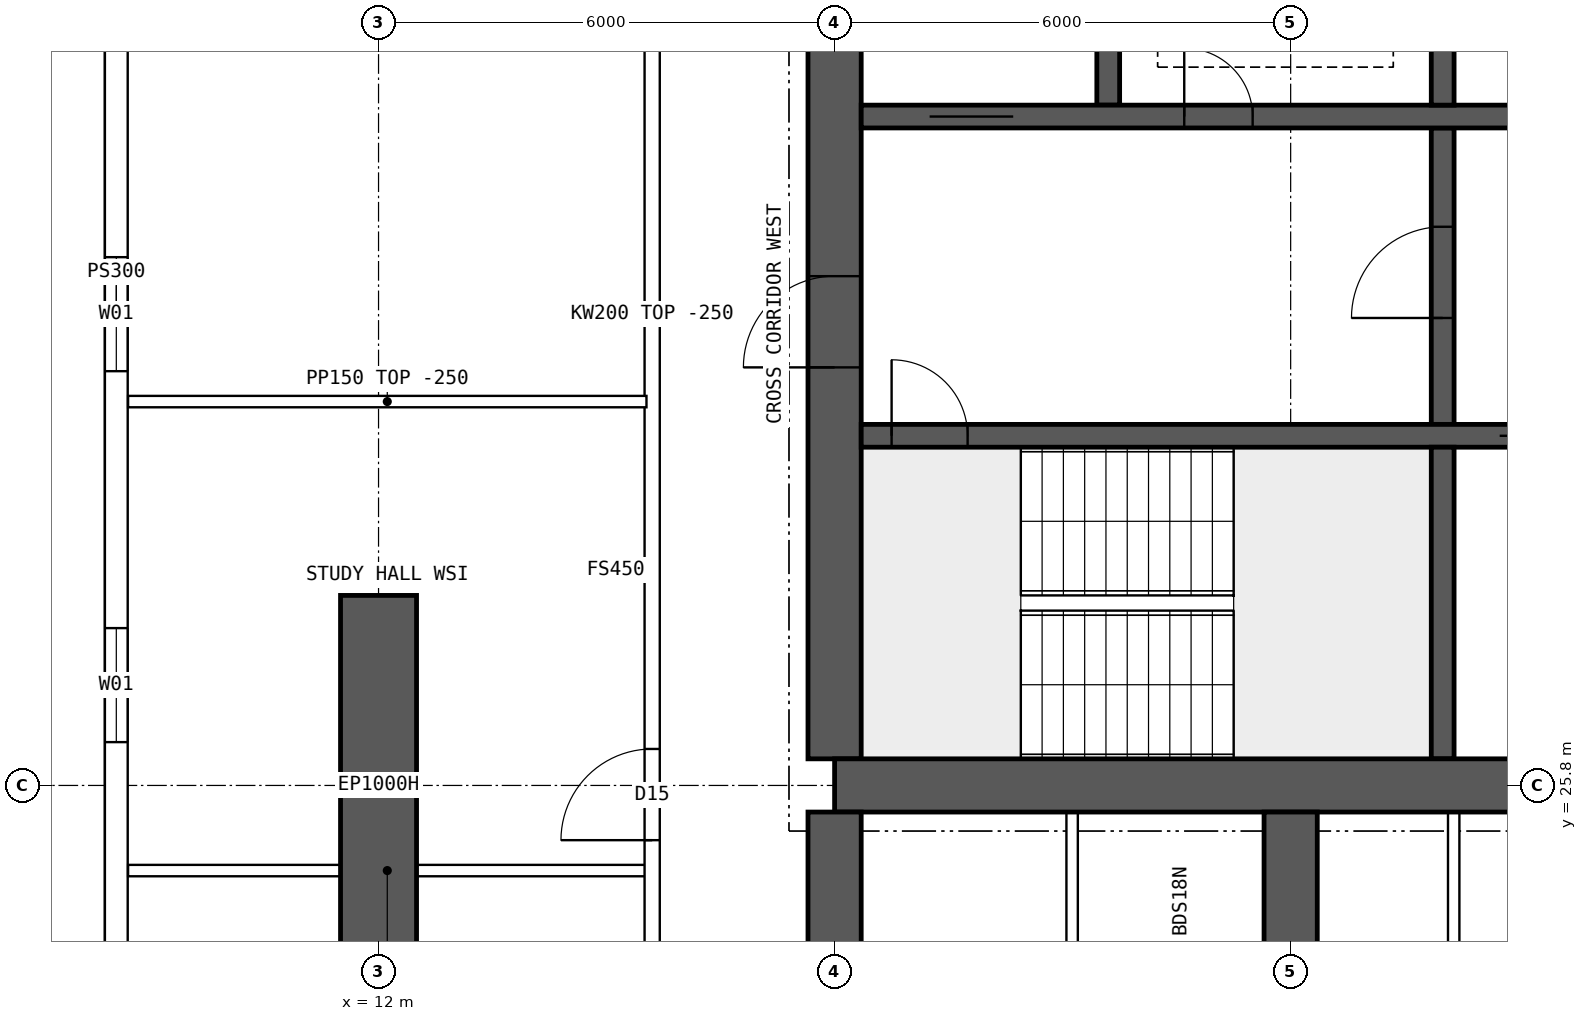
"""IFC4 building model, lengths in metres.
Left out: names, types, materials, properties, quantities, classifications, styles, units other than length and angle.
Written with IfcOpenShell. Run it as: python <this file> out.ifc"""

import sys

from ifc_helpers import new_model, si_unit, direction, frame, frame_2d, origin, place, context, subcontext, project, spatial, polyline, rectangle, outline, extrude, element, fill, save


model = new_model("IFC4")
c1 = context("Model", 3, precision=1e-05, world=origin(), true_north=direction((0.0, 1.0)))
c2 = subcontext(c1, "Body", "Model", "MODEL_VIEW")
j1 = project(units=[si_unit("LENGTHUNIT", "METRE"), si_unit("PLANEANGLEUNIT", "RADIAN")], contexts=[c1])
p1 = place(None, origin())
s1 = spatial("IfcSite", under=j1, at=p1, CompositionType="ELEMENT")
p2 = place(p1, origin())
s2 = spatial("IfcBuilding", under=s1, at=p2, CompositionType="ELEMENT")
p3 = place(p2, frame((0.0, 0.0, 231.55)))
s3 = spatial("IfcBuildingStorey", under=s2, at=p3, CompositionType="ELEMENT", Elevation=231.55)
p4 = place(p3, frame((12.0, 23.3, 0.0), z_axis=(0.0, 0.0, 1.0), x_axis=(0.0, 1.0, 0.0)))
e1 = element("IfcWall", 1, at=p4, inside=s3, PredefinedType="SHEAR", context=c2, shape_type="SweptSolid", body=[
    extrude(rectangle(XDim=5.0, YDim=1.0, at=frame_2d((2.5, 0.0))), origin(), (0.0, 0.0, 1.0), 3.75),
])
p5 = place(p3, frame((18.0, 25.8, 0.0), z_axis=(0.0, 0.0, 1.0), x_axis=(1.0, 0.0, 0.0)))
e2 = element("IfcWall", 2, at=p5, inside=s3, PredefinedType="SHEAR", context=c2, shape_type="SweptSolid", body=[
    extrude(rectangle(XDim=48.0, YDim=0.7, at=frame_2d((24.0, 0.0))), origin(), (0.0, 0.0, 1.0), 3.75),
])
p6 = place(p3, frame((18.0, 26.15, 0.0), z_axis=(0.0, 0.0, 1.0), x_axis=(0.0, 1.0, 0.0)))
e3 = element("IfcWall", 3, at=p6, inside=s3, PredefinedType="SHEAR", context=c2, shape_type="SweptSolid", body=[
    extrude(rectangle(XDim=11.7, YDim=0.7, at=frame_2d((5.85, 0.0))), origin(), (0.0, 0.0, 1.0), 3.75),
])
p7 = place(p6, frame((5.15, 0.0, 0.0)))
e4 = element("IfcOpeningElement", 4, at=p7, cuts=e3, PredefinedType="OPENING", context=c2, shape_type="SweptSolid", body=[
    extrude(rectangle(XDim=1.2, YDim=2.1, at=frame_2d((0.6, 1.05))), frame((0.0, 0.36, 0.0), z_axis=(0.0, -1.0, 0.0), x_axis=(1.0, 0.0, 0.0)), (0.0, 0.0, 1.0), 0.72),
])
p8 = place(p3, frame((18.35, 30.4, 0.0), z_axis=(0.0, 0.0, 1.0), x_axis=(1.0, 0.0, 0.0)))
e5 = element("IfcWall", 5, at=p8, inside=s3, PredefinedType="SHEAR", context=c2, shape_type="SweptSolid", body=[
    extrude(rectangle(XDim=47.3, YDim=0.3, at=frame_2d((23.65, 0.0))), origin(), (0.0, 0.0, 1.0), 3.75),
])
p9 = place(p8, frame((0.4, 0.0, 0.0)))
e6 = element("IfcOpeningElement", 6, at=p9, cuts=e5, PredefinedType="OPENING", context=c2, shape_type="SweptSolid", body=[
    extrude(rectangle(XDim=1.0, YDim=2.1, at=frame_2d((0.5, 1.05))), frame((0.0, 0.16, 0.0), z_axis=(0.0, -1.0, 0.0), x_axis=(1.0, 0.0, 0.0)), (0.0, 0.0, 1.0), 0.32),
])
p10 = place(p8, frame((45.9, 0.0, 0.0)))
e7 = element("IfcOpeningElement", 7, at=p10, cuts=e5, PredefinedType="OPENING", context=c2, shape_type="SweptSolid", body=[
    extrude(rectangle(XDim=1.0, YDim=2.1, at=frame_2d((0.5, 1.05))), frame((0.0, 0.16, 0.0), z_axis=(0.0, -1.0, 0.0), x_axis=(1.0, 0.0, 0.0)), (0.0, 0.0, 1.0), 0.32),
])
p11 = place(p8, frame((8.4, 0.0, 0.0)))
e8 = element("IfcOpeningElement", 8, at=p11, cuts=e5, PredefinedType="OPENING", context=c2, shape_type="SweptSolid", body=[
    extrude(rectangle(XDim=1.1, YDim=2.1, at=frame_2d((0.55, 1.05))), frame((0.0, 0.16, 0.0), z_axis=(0.0, -1.0, 0.0), x_axis=(1.0, 0.0, 0.0)), (0.0, 0.0, 1.0), 0.32),
])
p12 = place(p8, frame((11.0, 0.0, 0.0)))
e9 = element("IfcOpeningElement", 9, at=p12, cuts=e5, PredefinedType="OPENING", context=c2, shape_type="SweptSolid", body=[
    extrude(rectangle(XDim=1.1, YDim=2.1, at=frame_2d((0.55, 1.05))), frame((0.0, 0.16, 0.0), z_axis=(0.0, -1.0, 0.0), x_axis=(1.0, 0.0, 0.0)), (0.0, 0.0, 1.0), 0.32),
])
p13 = place(p8, frame((13.6, 0.0, 0.0)))
e10 = element("IfcOpeningElement", 10, at=p13, cuts=e5, PredefinedType="OPENING", context=c2, shape_type="SweptSolid", body=[
    extrude(rectangle(XDim=1.1, YDim=2.1, at=frame_2d((0.55, 1.05))), frame((0.0, 0.16, 0.0), z_axis=(0.0, -1.0, 0.0), x_axis=(1.0, 0.0, 0.0)), (0.0, 0.0, 1.0), 0.32),
])
p14 = place(p8, frame((16.2, 0.0, 0.0)))
e11 = element("IfcOpeningElement", 11, at=p14, cuts=e5, PredefinedType="OPENING", context=c2, shape_type="SweptSolid", body=[
    extrude(rectangle(XDim=1.1, YDim=2.1, at=frame_2d((0.55, 1.05))), frame((0.0, 0.16, 0.0), z_axis=(0.0, -1.0, 0.0), x_axis=(1.0, 0.0, 0.0)), (0.0, 0.0, 1.0), 0.32),
])
p15 = place(p8, frame((18.975, 0.0, 0.0)))
e12 = element("IfcOpeningElement", 12, at=p15, cuts=e5, PredefinedType="OPENING", context=c2, shape_type="SweptSolid", body=[
    extrude(rectangle(XDim=0.9, YDim=2.1, at=frame_2d((0.45, 1.05))), frame((0.0, 0.16, 0.0), z_axis=(0.0, -1.0, 0.0), x_axis=(1.0, 0.0, 0.0)), (0.0, 0.0, 1.0), 0.32),
])
p16 = place(p8, frame((24.475, 0.0, 0.0)))
e13 = element("IfcOpeningElement", 13, at=p16, cuts=e5, PredefinedType="OPENING", context=c2, shape_type="SweptSolid", body=[
    extrude(rectangle(XDim=0.9, YDim=2.1, at=frame_2d((0.45, 1.05))), frame((0.0, 0.16, 0.0), z_axis=(0.0, -1.0, 0.0), x_axis=(1.0, 0.0, 0.0)), (0.0, 0.0, 1.0), 0.32),
])
p17 = place(p8, frame((30.267, 0.0, 0.0)))
e14 = element("IfcOpeningElement", 14, at=p17, cuts=e5, PredefinedType="OPENING", context=c2, shape_type="SweptSolid", body=[
    extrude(rectangle(XDim=1.1, YDim=2.1, at=frame_2d((0.55, 1.05))), frame((0.0, 0.16, 0.0), z_axis=(0.0, -1.0, 0.0), x_axis=(1.0, 0.0, 0.0)), (0.0, 0.0, 1.0), 0.32),
])
p18 = place(p8, frame((33.8, 0.0, 0.0)))
e15 = element("IfcOpeningElement", 15, at=p18, cuts=e5, PredefinedType="OPENING", context=c2, shape_type="SweptSolid", body=[
    extrude(rectangle(XDim=1.1, YDim=2.1, at=frame_2d((0.55, 1.05))), frame((0.0, 0.16, 0.0), z_axis=(0.0, -1.0, 0.0), x_axis=(1.0, 0.0, 0.0)), (0.0, 0.0, 1.0), 0.32),
])
p19 = place(p8, frame((37.333, 0.0, 0.0)))
e16 = element("IfcOpeningElement", 16, at=p19, cuts=e5, PredefinedType="OPENING", context=c2, shape_type="SweptSolid", body=[
    extrude(rectangle(XDim=1.1, YDim=2.1, at=frame_2d((0.55, 1.05))), frame((0.0, 0.16, 0.0), z_axis=(0.0, -1.0, 0.0), x_axis=(1.0, 0.0, 0.0)), (0.0, 0.0, 1.0), 0.32),
])
p20 = place(p3, frame((18.35, 34.6, 0.0), z_axis=(0.0, 0.0, 1.0), x_axis=(1.0, 0.0, 0.0)))
e17 = element("IfcWall", 17, at=p20, inside=s3, PredefinedType="SHEAR", context=c2, shape_type="SweptSolid", body=[
    extrude(rectangle(XDim=47.3, YDim=0.3, at=frame_2d((23.65, 0.0))), origin(), (0.0, 0.0, 1.0), 3.75),
])
p21 = place(p20, frame((0.9, 0.0, 0.0)))
e18 = element("IfcOpeningElement", 18, at=p21, cuts=e17, PredefinedType="OPENING", context=c2, shape_type="SweptSolid", body=[
    extrude(rectangle(XDim=1.1, YDim=2.1, at=frame_2d((0.55, 1.05))), frame((0.0, 0.16, 0.0), z_axis=(0.0, -1.0, 0.0), x_axis=(1.0, 0.0, 0.0)), (0.0, 0.0, 1.0), 0.32),
])
p22 = place(p20, frame((45.3, 0.0, 0.0)))
e19 = element("IfcOpeningElement", 19, at=p22, cuts=e17, PredefinedType="OPENING", context=c2, shape_type="SweptSolid", body=[
    extrude(rectangle(XDim=1.1, YDim=2.1, at=frame_2d((0.55, 1.05))), frame((0.0, 0.16, 0.0), z_axis=(0.0, -1.0, 0.0), x_axis=(1.0, 0.0, 0.0)), (0.0, 0.0, 1.0), 0.32),
])
p23 = place(p20, frame((4.25, 0.0, 0.0)))
e20 = element("IfcOpeningElement", 20, at=p23, cuts=e17, PredefinedType="OPENING", context=c2, shape_type="SweptSolid", body=[
    extrude(rectangle(XDim=0.9, YDim=2.1, at=frame_2d((0.45, 1.05))), frame((0.0, 0.16, 0.0), z_axis=(0.0, -1.0, 0.0), x_axis=(1.0, 0.0, 0.0)), (0.0, 0.0, 1.0), 0.32),
])
p24 = place(p20, frame((42.15, 0.0, 0.0)))
e21 = element("IfcOpeningElement", 21, at=p24, cuts=e17, PredefinedType="OPENING", context=c2, shape_type="SweptSolid", body=[
    extrude(rectangle(XDim=0.9, YDim=2.1, at=frame_2d((0.45, 1.05))), frame((0.0, 0.16, 0.0), z_axis=(0.0, -1.0, 0.0), x_axis=(1.0, 0.0, 0.0)), (0.0, 0.0, 1.0), 0.32),
])
p25 = place(p20, frame((9.025, 0.0, 0.0)))
e22 = element("IfcOpeningElement", 22, at=p25, cuts=e17, PredefinedType="OPENING", context=c2, shape_type="SweptSolid", body=[
    extrude(rectangle(XDim=0.9, YDim=2.1, at=frame_2d((0.45, 1.05))), frame((0.0, 0.16, 0.0), z_axis=(0.0, -1.0, 0.0), x_axis=(1.0, 0.0, 0.0)), (0.0, 0.0, 1.0), 0.32),
])
p26 = place(p20, frame((12.999, 0.0, 0.0)))
e23 = element("IfcOpeningElement", 23, at=p26, cuts=e17, PredefinedType="OPENING", context=c2, shape_type="SweptSolid", body=[
    extrude(rectangle(XDim=0.9, YDim=2.1, at=frame_2d((0.45, 1.05))), frame((0.0, 0.16, 0.0), z_axis=(0.0, -1.0, 0.0), x_axis=(1.0, 0.0, 0.0)), (0.0, 0.0, 1.0), 0.32),
])
p27 = place(p20, frame((16.646, 0.0, 0.0)))
e24 = element("IfcOpeningElement", 24, at=p27, cuts=e17, PredefinedType="OPENING", context=c2, shape_type="SweptSolid", body=[
    extrude(rectangle(XDim=0.9, YDim=2.1, at=frame_2d((0.45, 1.05))), frame((0.0, 0.16, 0.0), z_axis=(0.0, -1.0, 0.0), x_axis=(1.0, 0.0, 0.0)), (0.0, 0.0, 1.0), 0.32),
])
p28 = place(p20, frame((20.405, 0.0, 0.0)))
e25 = element("IfcOpeningElement", 25, at=p28, cuts=e17, PredefinedType="OPENING", context=c2, shape_type="SweptSolid", body=[
    extrude(rectangle(XDim=0.9, YDim=2.1, at=frame_2d((0.45, 1.05))), frame((0.0, 0.16, 0.0), z_axis=(0.0, -1.0, 0.0), x_axis=(1.0, 0.0, 0.0)), (0.0, 0.0, 1.0), 0.32),
])
p29 = place(p20, frame((24.811, 0.0, 0.0)))
e26 = element("IfcOpeningElement", 26, at=p29, cuts=e17, PredefinedType="OPENING", context=c2, shape_type="SweptSolid", body=[
    extrude(rectangle(XDim=0.9, YDim=2.1, at=frame_2d((0.45, 1.05))), frame((0.0, 0.16, 0.0), z_axis=(0.0, -1.0, 0.0), x_axis=(1.0, 0.0, 0.0)), (0.0, 0.0, 1.0), 0.32),
])
p30 = place(p20, frame((27.608, 0.0, 0.0)))
e27 = element("IfcOpeningElement", 27, at=p30, cuts=e17, PredefinedType="OPENING", context=c2, shape_type="SweptSolid", body=[
    extrude(rectangle(XDim=0.9, YDim=2.1, at=frame_2d((0.45, 1.05))), frame((0.0, 0.16, 0.0), z_axis=(0.0, -1.0, 0.0), x_axis=(1.0, 0.0, 0.0)), (0.0, 0.0, 1.0), 0.32),
])
p31 = place(p20, frame((33.729, 0.0, 0.0)))
e28 = element("IfcOpeningElement", 28, at=p31, cuts=e17, PredefinedType="OPENING", context=c2, shape_type="SweptSolid", body=[
    extrude(rectangle(XDim=0.9, YDim=2.1, at=frame_2d((0.45, 1.05))), frame((0.0, 0.16, 0.0), z_axis=(0.0, -1.0, 0.0), x_axis=(1.0, 0.0, 0.0)), (0.0, 0.0, 1.0), 0.32),
])
p32 = place(p3, frame((26.0, 26.15, 0.0), z_axis=(0.0, 0.0, 1.0), x_axis=(0.0, 1.0, 0.0)))
e29 = element("IfcWall", 29, at=p32, inside=s3, PredefinedType="SHEAR", context=c2, shape_type="SweptSolid", body=[
    extrude(rectangle(XDim=4.1, YDim=0.3, at=frame_2d((2.05, 0.0))), origin(), (0.0, 0.0, 1.0), 3.75),
])
p33 = place(p3, frame((26.0, 30.55, 0.0), z_axis=(0.0, 0.0, 1.0), x_axis=(0.0, 1.0, 0.0)))
e30 = element("IfcWall", 30, at=p33, inside=s3, PredefinedType="SHEAR", context=c2, shape_type="SweptSolid", body=[
    extrude(rectangle(XDim=3.9, YDim=0.3, at=frame_2d((1.95, 0.0))), origin(), (0.0, 0.0, 1.0), 3.75),
])
p34 = place(p33, frame((1.4, 0.0, 0.0)))
e31 = element("IfcOpeningElement", 31, at=p34, cuts=e30, PredefinedType="OPENING", context=c2, shape_type="SweptSolid", body=[
    extrude(rectangle(XDim=1.2, YDim=2.1, at=frame_2d((0.6, 1.05))), frame((0.0, 0.16, 0.0), z_axis=(0.0, -1.0, 0.0), x_axis=(1.0, 0.0, 0.0)), (0.0, 0.0, 1.0), 0.32),
])
for number, where, z_axis, x_axis in (
    (32, (21.6, 34.75, 0.0), (0.0, 0.0, 1.0), (0.0, 1.0, 0.0)),
    (33, (26.0, 34.75, 0.0), (0.0, 0.0, 1.0), (0.0, 1.0, 0.0)),
):
    element("IfcWall", number, at=place(p3, frame(where, z_axis=z_axis, x_axis=x_axis)), inside=s3, PredefinedType="SHEAR", context=c2, shape_type="SweptSolid", body=[
        extrude(rectangle(XDim=3.1, YDim=0.3, at=frame_2d((1.55, 0.0))), origin(), (0.0, 0.0, 1.0), 3.75),
    ])
for number, where, z_axis, x_axis in (
    (34, (18.0, 18.4, 0.0), (0.0, 0.0, 1.0), (0.0, 1.0, 0.0)),
    (35, (24.0, 18.4, 0.0), (0.0, 0.0, 1.0), (0.0, 1.0, 0.0)),
):
    element("IfcWall", number, at=place(p3, frame(where, z_axis=z_axis, x_axis=x_axis)), inside=s3, PredefinedType="SHEAR", context=c2, shape_type="SweptSolid", body=[
        extrude(rectangle(XDim=7.05, YDim=0.7, at=frame_2d((3.525, 0.0))), origin(), (0.0, 0.0, 1.0), 3.75),
    ])
p35 = place(p3, frame((8.55, 44.2, 0.0), z_axis=(0.0, 0.0, 1.0), x_axis=(0.0, -1.0, 0.0)))
e36 = element("IfcWall", 36, at=p35, inside=s3, PredefinedType="SOLIDWALL", context=c2, shape_type="SweptSolid", body=[
    extrude(outline(polyline([(-0.015, -0.15), (24.415, -0.15), (24.385, 0.15), (0.015, 0.15), (-0.015, -0.15)])), origin(), (0.0, 0.0, 1.0), 3.5),
])
p36 = place(p35, frame((1.69, 0.0, 0.9)))
e37 = element("IfcOpeningElement", 37, at=p36, cuts=e36, PredefinedType="OPENING", context=c2, shape_type="SweptSolid", body=[
    extrude(rectangle(XDim=1.5, YDim=2.0, at=frame_2d((0.75, 1.0))), frame((0.0, 0.16, 0.0), z_axis=(0.0, -1.0, 0.0), x_axis=(1.0, 0.0, 0.0)), (0.0, 0.0, 1.0), 0.32),
])
p37 = place(p35, frame((6.57, 0.0, 0.9)))
e38 = element("IfcOpeningElement", 38, at=p37, cuts=e36, PredefinedType="OPENING", context=c2, shape_type="SweptSolid", body=[
    extrude(rectangle(XDim=1.5, YDim=2.0, at=frame_2d((0.75, 1.0))), frame((0.0, 0.16, 0.0), z_axis=(0.0, -1.0, 0.0), x_axis=(1.0, 0.0, 0.0)), (0.0, 0.0, 1.0), 0.32),
])
p38 = place(p35, frame((11.45, 0.0, 0.9)))
e39 = element("IfcOpeningElement", 39, at=p38, cuts=e36, PredefinedType="OPENING", context=c2, shape_type="SweptSolid", body=[
    extrude(rectangle(XDim=1.5, YDim=2.0, at=frame_2d((0.75, 1.0))), frame((0.0, 0.16, 0.0), z_axis=(0.0, -1.0, 0.0), x_axis=(1.0, 0.0, 0.0)), (0.0, 0.0, 1.0), 0.32),
])
p39 = place(p35, frame((16.33, 0.0, 0.9)))
e40 = element("IfcOpeningElement", 40, at=p39, cuts=e36, PredefinedType="OPENING", context=c2, shape_type="SweptSolid", body=[
    extrude(rectangle(XDim=1.5, YDim=2.0, at=frame_2d((0.75, 1.0))), frame((0.0, 0.16, 0.0), z_axis=(0.0, -1.0, 0.0), x_axis=(1.0, 0.0, 0.0)), (0.0, 0.0, 1.0), 0.32),
])
p40 = place(p35, frame((21.21, 0.0, 0.9)))
e41 = element("IfcOpeningElement", 41, at=p40, cuts=e36, PredefinedType="OPENING", context=c2, shape_type="SweptSolid", body=[
    extrude(rectangle(XDim=1.5, YDim=2.0, at=frame_2d((0.75, 1.0))), frame((0.0, 0.16, 0.0), z_axis=(0.0, -1.0, 0.0), x_axis=(1.0, 0.0, 0.0)), (0.0, 0.0, 1.0), 0.32),
])
for number, where, z_axis, x_axis in (
    (42, (21.125, 18.5, 0.0), (0.0, 0.0, 1.0), (0.0, 1.0, 0.0)),
    (43, (26.145, 18.5, 0.0), (0.0, 0.0, 1.0), (0.0, 1.0, 0.0)),
):
    element("IfcWall", number, at=place(p3, frame(where, z_axis=z_axis, x_axis=x_axis)), inside=s3, PredefinedType="PARTITIONING", context=c2, shape_type="SweptSolid", body=[
        extrude(rectangle(XDim=6.95, YDim=0.15, at=frame_2d((3.475, 0.0))), origin(), (0.0, 0.0, 1.0), 3.5),
    ])
p41 = place(p3, frame((8.705, 30.85, 0.0), z_axis=(0.0, 0.0, 1.0), x_axis=(1.0, 0.0, 0.0)))
e44 = element("IfcWall", 44, at=p41, inside=s3, PredefinedType="PARTITIONING", context=c2, shape_type="SweptSolid", body=[
    extrude(outline(polyline([(0.0, 0.0), (6.82, 0.0), (6.82, 3.5), (3.597, 3.5), (3.595, 3.05), (2.997, 3.05), (2.995, 3.5), (0.0, 3.5), (0.0, 0.0)])), frame((0.0, 0.075, 0.0), z_axis=(0.0, -1.0, 0.0), x_axis=(1.0, 0.0, 0.0)), (0.0, 0.0, 1.0), 0.15),
])
p42 = place(p3, frame((15.6, 11.646, 0.0), z_axis=(0.0, 0.0, 1.0), x_axis=(0.0, 1.0, 0.0)))
e45 = element("IfcWall", 45, at=p42, inside=s3, PredefinedType="SOLIDWALL", context=c2, shape_type="SweptSolid", body=[
    extrude(rectangle(XDim=40.708, YDim=0.2, at=frame_2d((20.354, 0.0))), origin(), (0.0, 0.0, 1.0), 3.5),
])
p43 = place(p42, frame((13.434, 0.0, 0.0)))
e46 = element("IfcOpeningElement", 46, at=p43, cuts=e45, PredefinedType="OPENING", context=c2, shape_type="SweptSolid", body=[
    extrude(rectangle(XDim=1.2, YDim=2.1, at=frame_2d((0.6, 1.05))), frame((0.0, 0.11, 0.0), z_axis=(0.0, -1.0, 0.0), x_axis=(1.0, 0.0, 0.0)), (0.0, 0.0, 1.0), 0.22),
])
p44 = place(p42, frame((5.104, 0.0, 0.0)))
e47 = element("IfcOpeningElement", 47, at=p44, cuts=e45, PredefinedType="OPENING", context=c2, shape_type="SweptSolid", body=[
    extrude(rectangle(XDim=1.4, YDim=2.1, at=frame_2d((0.7, 1.05))), frame((0.0, 0.11, 0.0), z_axis=(0.0, -1.0, 0.0), x_axis=(1.0, 0.0, 0.0)), (0.0, 0.0, 1.0), 0.22),
])
p45 = place(p42, frame((34.104, 0.0, 0.0)))
e48 = element("IfcOpeningElement", 48, at=p45, cuts=e45, PredefinedType="OPENING", context=c2, shape_type="SweptSolid", body=[
    extrude(rectangle(XDim=1.4, YDim=2.1, at=frame_2d((0.7, 1.05))), frame((0.0, 0.11, 0.0), z_axis=(0.0, -1.0, 0.0), x_axis=(1.0, 0.0, 0.0)), (0.0, 0.0, 1.0), 0.22),
])
p46 = place(p3, frame((8.705, 24.68, 0.0), z_axis=(0.0, 0.0, 1.0), x_axis=(1.0, 0.0, 0.0)))
e49 = element("IfcWall", 49, at=p46, inside=s3, PredefinedType="PARTITIONING", context=c2, shape_type="SweptSolid", body=[
    extrude(rectangle(XDim=6.82, YDim=0.15, at=frame_2d((3.41, 0.0))), origin(), (0.0, 0.0, 1.0), 3.5),
])
p47 = place(p38, origin())
e50 = element("IfcWindow", 50, at=p47, inside=s3, PartitioningType="SINGLE_PANEL", PredefinedType="WINDOW", context=c2, shape_type="SweptSolid", body=[
    extrude(rectangle(XDim=1.5, YDim=2.0, at=frame_2d((0.75, 1.0))), frame((0.0, 0.03, 0.0), z_axis=(0.0, -1.0, 0.0), x_axis=(1.0, 0.0, 0.0)), (0.0, 0.0, 1.0), 0.06),
])
fill(e39, e50)
p48 = place(p39, origin())
e51 = element("IfcWindow", 51, at=p48, inside=s3, PartitioningType="SINGLE_PANEL", PredefinedType="WINDOW", context=c2, shape_type="SweptSolid", body=[
    extrude(rectangle(XDim=1.5, YDim=2.0, at=frame_2d((0.75, 1.0))), frame((0.0, 0.03, 0.0), z_axis=(0.0, -1.0, 0.0), x_axis=(1.0, 0.0, 0.0)), (0.0, 0.0, 1.0), 0.06),
])
fill(e40, e51)
p49 = place(p7, origin())
e52 = element("IfcDoor", 52, at=p49, inside=s3, OperationType="SINGLE_SWING_LEFT", PredefinedType="DOOR", context=c2, shape_type="SweptSolid", body=[
    extrude(rectangle(XDim=1.2, YDim=2.1, at=frame_2d((0.6, 1.05))), frame((0.0, 0.025, 0.0), z_axis=(0.0, -1.0, 0.0), x_axis=(1.0, 0.0, 0.0)), (0.0, 0.0, 1.0), 0.05),
])
fill(e4, e52)
p50 = place(p9, origin())
e53 = element("IfcDoor", 53, at=p50, inside=s3, OperationType="SINGLE_SWING_LEFT", PredefinedType="DOOR", context=c2, shape_type="SweptSolid", body=[
    extrude(rectangle(XDim=1.0, YDim=2.1, at=frame_2d((0.5, 1.05))), frame((0.0, 0.025, 0.0), z_axis=(0.0, -1.0, 0.0), x_axis=(1.0, 0.0, 0.0)), (0.0, 0.0, 1.0), 0.05),
])
fill(e6, e53)
p51 = place(p21, origin())
e54 = element("IfcDoor", 54, at=p51, inside=s3, OperationType="DOUBLE_DOOR_SLIDING", PredefinedType="DOOR", context=c2, shape_type="SweptSolid", body=[
    extrude(rectangle(XDim=1.1, YDim=2.1, at=frame_2d((0.55, 1.05))), frame((0.0, 0.025, 0.0), z_axis=(0.0, -1.0, 0.0), x_axis=(1.0, 0.0, 0.0)), (0.0, 0.0, 1.0), 0.05),
])
fill(e18, e54)
p52 = place(p23, origin())
e55 = element("IfcDoor", 55, at=p52, inside=s3, OperationType="SINGLE_SWING_LEFT", PredefinedType="DOOR", context=c2, shape_type="SweptSolid", body=[
    extrude(rectangle(XDim=0.9, YDim=2.1, at=frame_2d((0.45, 1.05))), frame((0.0, 0.025, 0.0), z_axis=(0.0, -1.0, 0.0), x_axis=(1.0, 0.0, 0.0)), (0.0, 0.0, 1.0), 0.05),
])
fill(e20, e55)
p53 = place(p34, origin())
e56 = element("IfcDoor", 56, at=p53, inside=s3, OperationType="SINGLE_SWING_LEFT", PredefinedType="DOOR", context=c2, shape_type="SweptSolid", body=[
    extrude(rectangle(XDim=1.2, YDim=2.1, at=frame_2d((0.6, 1.05))), frame((0.0, 0.025, 0.0), z_axis=(0.0, -1.0, 0.0), x_axis=(1.0, 0.0, 0.0)), (0.0, 0.0, 1.0), 0.05),
])
fill(e31, e56)
p54 = place(p11, origin())
e57 = element("IfcDoor", 57, at=p54, inside=s3, OperationType="DOUBLE_DOOR_SLIDING", PredefinedType="DOOR", context=c2, shape_type="SweptSolid", body=[
    extrude(rectangle(XDim=1.1, YDim=2.1, at=frame_2d((0.55, 1.05))), frame((0.0, 0.025, 0.0), z_axis=(0.0, -1.0, 0.0), x_axis=(1.0, 0.0, 0.0)), (0.0, 0.0, 1.0), 0.05),
])
fill(e8, e57)
p55 = place(p43, origin())
e58 = element("IfcDoor", 58, at=p55, inside=s3, OperationType="SINGLE_SWING_LEFT", PredefinedType="DOOR", context=c2, shape_type="SweptSolid", body=[
    extrude(rectangle(XDim=1.2, YDim=2.1, at=frame_2d((0.6, 1.05))), frame((0.0, 0.025, 0.0), z_axis=(0.0, -1.0, 0.0), x_axis=(1.0, 0.0, 0.0)), (0.0, 0.0, 1.0), 0.05),
])
fill(e46, e58)
save(model, sys.argv[1])
